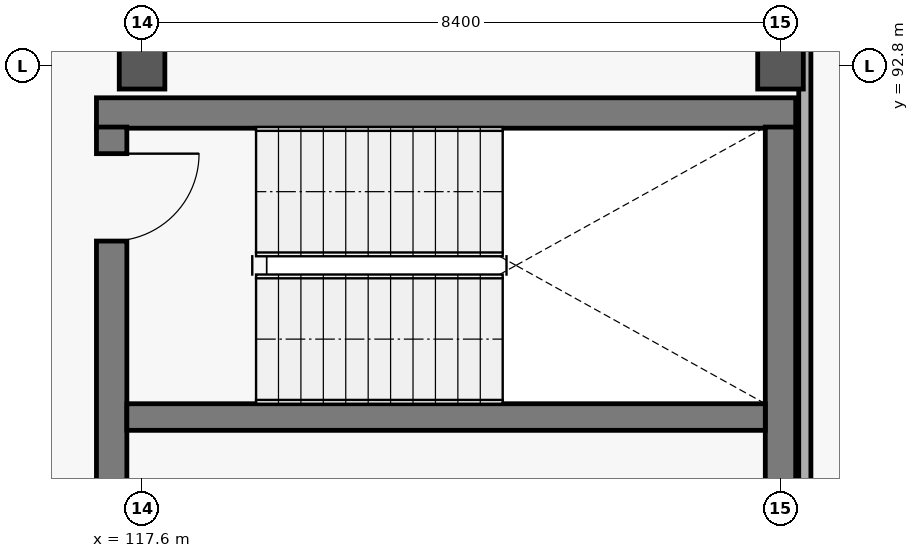
"""IFC4 building model, lengths in metres.
Left out: names, types, materials, properties, quantities, classifications, styles, units other than length and angle.
Written with IfcOpenShell. Run it as: python <this file> out.ifc"""

import sys

from ifc_helpers import new_model, si_unit, direction, frame, frame_2d, origin, origin_2d, place, context, subcontext, project, spatial, rectangle, extrude, element, fill, save


model = new_model("IFC4")
c1 = context("Model", 3, precision=1e-05, world=origin(), true_north=direction((0.0, 1.0)))
c2 = subcontext(c1, "Body", "Model", "MODEL_VIEW")
j1 = project(units=[si_unit("LENGTHUNIT", "METRE"), si_unit("PLANEANGLEUNIT", "RADIAN")], contexts=[c1])
p1 = place(None, origin())
s1 = spatial("IfcSite", under=j1, at=p1, CompositionType="ELEMENT")
p2 = place(p1, origin())
s2 = spatial("IfcBuilding", under=s1, at=p2, CompositionType="ELEMENT")
p3 = place(p2, frame((0.0, 0.0, 10.8)))
s3 = spatial("IfcBuildingStorey", under=s2, at=p3, CompositionType="ELEMENT", Elevation=10.8)
for number, where, z_axis, x_axis in (
    (1, (117.6, 92.8, 0.0), (0.0, 0.0, 1.0), (1.0, 0.0, 0.0)),
    (2, (126.0, 92.8, 0.0), (0.0, 0.0, 1.0), (1.0, 0.0, 0.0)),
):
    element("IfcColumn", number, at=place(p3, frame(where, z_axis=z_axis, x_axis=x_axis)), inside=s3, PredefinedType="COLUMN", context=c2, shape_type="SweptSolid", body=[
        extrude(rectangle(XDim=0.6, YDim=0.6, at=origin_2d()), origin(), (0.0, 0.0, 1.0), 4.2),
    ])
p4 = place(p3, frame((126.2, 92.185, 0.0), z_axis=(0.0, 0.0, 1.0), x_axis=(-1.0, 0.0, 0.0)))
e3 = element("IfcWall", 3, at=p4, inside=s3, PredefinedType="SHEAR", context=c2, shape_type="SweptSolid", body=[
    extrude(rectangle(XDim=9.2, YDim=0.4, at=frame_2d((4.6, 0.0))), origin(), (0.0, 0.0, 1.0), 3.92),
])
p5 = place(p3, frame((117.2, 92.0, 0.0), z_axis=(0.0, 0.0, 1.0), x_axis=(0.0, -1.0, 0.0)))
e4 = element("IfcWall", 4, at=p5, inside=s3, PredefinedType="SHEAR", context=c2, shape_type="SweptSolid", body=[
    extrude(rectangle(XDim=7.2, YDim=0.4, at=frame_2d((3.6, 0.0))), origin(), (0.0, 0.0, 1.0), 3.92),
])
p6 = place(p5, frame((0.35, 0.0, 0.0)))
e5 = element("IfcOpeningElement", 5, at=p6, cuts=e4, PredefinedType="OPENING", context=c2, shape_type="SweptSolid", body=[
    extrude(rectangle(XDim=1.15, YDim=2.2, at=frame_2d((0.575, 1.1))), frame((0.0, 0.21, 0.0), z_axis=(0.0, -1.0, 0.0), x_axis=(1.0, 0.0, 0.0)), (0.0, 0.0, 1.0), 0.42),
])
p7 = place(p3, frame((126.0, 84.8, 0.0), z_axis=(0.0, 0.0, 1.0), x_axis=(0.0, 1.0, 0.0)))
e6 = element("IfcWall", 6, at=p7, inside=s3, PredefinedType="SHEAR", context=c2, shape_type="SweptSolid", body=[
    extrude(rectangle(XDim=7.2, YDim=0.4, at=frame_2d((3.6, 0.0))), origin(), (0.0, 0.0, 1.0), 3.92),
])
p8 = place(p3, frame((117.4, 88.185, 0.0), z_axis=(0.0, 0.0, 1.0), x_axis=(1.0, 0.0, 0.0)))
e7 = element("IfcWall", 7, at=p8, inside=s3, PredefinedType="SHEAR", context=c2, shape_type="SweptSolid", body=[
    extrude(rectangle(XDim=8.4, YDim=0.35, at=frame_2d((4.2, 0.0))), origin(), (0.0, 0.0, 1.0), 3.92),
])
p9 = place(p3, frame((126.32, 84.32, 0.0), z_axis=(0.0, 0.0, 1.0), x_axis=(0.0, 1.0, 0.0)))
e8 = element("IfcWall", 8, at=p9, inside=s3, PredefinedType="PARTITIONING", context=c2, shape_type="SweptSolid", body=[
    extrude(rectangle(XDim=11.96, YDim=0.16, at=frame_2d((5.98, 0.0))), origin(), (0.0, 0.0, 1.0), 3.02),
])
p10 = place(p9, frame((10.4, 0.0, 0.0)))
e9 = element("IfcOpeningElement", 9, at=p10, cuts=e8, PredefinedType="OPENING", context=c2, shape_type="SweptSolid", body=[
    extrude(rectangle(XDim=1.08, YDim=2.25, at=frame_2d((0.54, 1.125))), frame((0.0, 0.09, 0.0), z_axis=(0.0, -1.0, 0.0), x_axis=(1.0, 0.0, 0.0)), (0.0, 0.0, 1.0), 0.18),
])
p11 = place(p6, origin())
e10 = element("IfcDoor", 10, at=p11, inside=s3, OperationType="SINGLE_SWING_LEFT", PredefinedType="DOOR", context=c2, shape_type="SweptSolid", body=[
    extrude(rectangle(XDim=1.15, YDim=2.2, at=frame_2d((0.575, 1.1))), frame((0.0, 0.025, 0.0), z_axis=(0.0, -1.0, 0.0), x_axis=(1.0, 0.0, 0.0)), (0.0, 0.0, 1.0), 0.05),
])
fill(e5, e10)
save(model, sys.argv[1])
